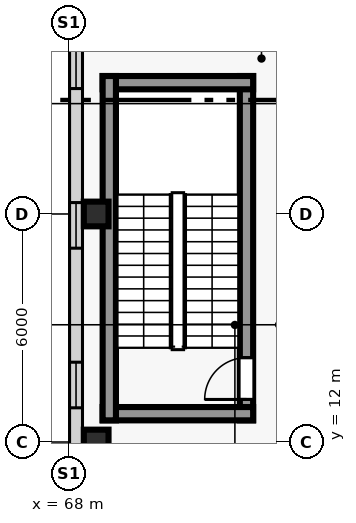
"""IFC4 building model, lengths in metres.
Left out: names, types, materials, properties, quantities, classifications, styles, units other than length and angle.
Written with IfcOpenShell. Run it as: python <this file> out.ifc"""

import sys

from ifc_helpers import new_model, si_unit, direction, frame, frame_2d, origin, origin_2d, place, context, subcontext, project, spatial, rectangle, extrude, source, transform, mapped, element, fill, save


model = new_model("IFC4")
c1 = context("Model", 3, precision=1e-05, world=origin(), true_north=direction((0.0, 1.0)))
c2 = subcontext(c1, "Body", "Model", "MODEL_VIEW")
j1 = project(units=[si_unit("LENGTHUNIT", "METRE"), si_unit("PLANEANGLEUNIT", "RADIAN")], contexts=[c1])
p1 = place(None, origin())
s1 = spatial("IfcSite", under=j1, at=p1, CompositionType="ELEMENT")
p2 = place(p1, origin())
s2 = spatial("IfcBuilding", under=s1, at=p2, CompositionType="ELEMENT")
p3 = place(p2, frame((0.0, 0.0, 9.0)))
s3 = spatial("IfcBuildingStorey", under=s2, at=p3, CompositionType="ELEMENT", Elevation=9.0)
p4 = place(p3, frame((72.655, 12.57, 0.0), z_axis=(0.0, 0.0, 1.0), x_axis=(0.0, 1.0, 0.0)))
e1 = element("IfcWall", 1, at=p4, inside=s3, PredefinedType="SHEAR", context=c2, shape_type="SweptSolid", body=[
    extrude(rectangle(XDim=9.06, YDim=0.35, at=frame_2d((4.53, 0.0))), origin(), (0.0, 0.0, 1.0), 4.5),
])
p5 = place(p4, frame((0.55, 0.0, 0.0)))
e2 = element("IfcOpeningElement", 2, at=p5, cuts=e1, PredefinedType="OPENING", context=c2, shape_type="SweptSolid", body=[
    extrude(rectangle(XDim=1.1, YDim=2.2, at=frame_2d((0.55, 1.1))), frame((0.0, 0.185, 0.0), z_axis=(0.0, -1.0, 0.0), x_axis=(1.0, 0.0, 0.0)), (0.0, 0.0, 1.0), 0.37),
])
for number, where, z_axis, x_axis in (
    (3, (68.87, 12.745, 0.0), (0.0, 0.0, 1.0), (1.0, 0.0, 0.0)),
    (4, (68.87, 21.455, 0.0), (0.0, 0.0, 1.0), (1.0, 0.0, 0.0)),
):
    element("IfcWall", number, at=place(p3, frame(where, z_axis=z_axis, x_axis=x_axis)), inside=s3, PredefinedType="SHEAR", context=c2, shape_type="SweptSolid", body=[
        extrude(rectangle(XDim=3.96, YDim=0.35, at=frame_2d((1.98, 0.0))), origin(), (0.0, 0.0, 1.0), 4.5),
    ])
p6 = place(p3, frame((69.045, 12.57, 0.0), z_axis=(0.0, 0.0, 1.0), x_axis=(0.0, 1.0, 0.0)))
e5 = element("IfcWall", 5, at=p6, inside=s3, PredefinedType="SHEAR", context=c2, shape_type="SweptSolid", body=[
    extrude(rectangle(XDim=9.06, YDim=0.35, at=frame_2d((4.53, 0.0))), origin(), (0.0, 0.0, 1.0), 4.5),
])
m1 = source(origin(), c2, "Body", "SweptSolid", [
    extrude(rectangle(XDim=0.65, YDim=0.65, at=origin_2d()), origin(), (0.0, 0.0, 1.0), 4.5),
])
for number, where, z_axis, x_axis in (
    (6, (68.7, 12.0, 0.0), (0.0, 0.0, 1.0), (1.0, 0.0, 0.0)),
    (7, (68.7, 18.0, 0.0), (0.0, 0.0, 1.0), (1.0, 0.0, 0.0)),
):
    element("IfcColumn", number, at=place(p3, frame(where, z_axis=z_axis, x_axis=x_axis)), inside=s3, PredefinedType="COLUMN", context=c2, shape_type="MappedRepresentation", body=[
        mapped(m1, transform((0.0, 0.0, 0.0), scale=1.0)),
    ])
p7 = place(p3, frame((68.17, 41.83, 0.0), z_axis=(0.0, 0.0, 1.0), x_axis=(0.0, -1.0, 0.0)))
e8 = element("IfcWall", 8, at=p7, inside=s3, PredefinedType="SOLIDWALL", context=c2, shape_type="SweptSolid", body=[
    extrude(rectangle(XDim=35.66, YDim=0.34, at=frame_2d((17.83, 0.0))), origin(), (0.0, 0.0, 1.0), 4.2),
])
p8 = place(p7, frame((2.53, 0.0, 0.95)))
e9 = element("IfcOpeningElement", 9, at=p8, cuts=e8, PredefinedType="OPENING", context=c2, shape_type="SweptSolid", body=[
    extrude(rectangle(XDim=1.2, YDim=1.5, at=frame_2d((0.6, 0.75))), frame((0.0, 0.18, 0.0), z_axis=(0.0, -1.0, 0.0), x_axis=(1.0, 0.0, 0.0)), (0.0, 0.0, 1.0), 0.36),
])
p9 = place(p7, frame((6.73, 0.0, 0.95)))
e10 = element("IfcOpeningElement", 10, at=p9, cuts=e8, PredefinedType="OPENING", context=c2, shape_type="SweptSolid", body=[
    extrude(rectangle(XDim=1.2, YDim=1.5, at=frame_2d((0.6, 0.75))), frame((0.0, 0.18, 0.0), z_axis=(0.0, -1.0, 0.0), x_axis=(1.0, 0.0, 0.0)), (0.0, 0.0, 1.0), 0.36),
])
p10 = place(p7, frame((10.93, 0.0, 0.95)))
e11 = element("IfcOpeningElement", 11, at=p10, cuts=e8, PredefinedType="OPENING", context=c2, shape_type="SweptSolid", body=[
    extrude(rectangle(XDim=1.2, YDim=1.5, at=frame_2d((0.6, 0.75))), frame((0.0, 0.18, 0.0), z_axis=(0.0, -1.0, 0.0), x_axis=(1.0, 0.0, 0.0)), (0.0, 0.0, 1.0), 0.36),
])
p11 = place(p7, frame((15.13, 0.0, 0.95)))
e12 = element("IfcOpeningElement", 12, at=p11, cuts=e8, PredefinedType="OPENING", context=c2, shape_type="SweptSolid", body=[
    extrude(rectangle(XDim=1.2, YDim=1.5, at=frame_2d((0.6, 0.75))), frame((0.0, 0.18, 0.0), z_axis=(0.0, -1.0, 0.0), x_axis=(1.0, 0.0, 0.0)), (0.0, 0.0, 1.0), 0.36),
])
p12 = place(p7, frame((19.33, 0.0, 0.95)))
e13 = element("IfcOpeningElement", 13, at=p12, cuts=e8, PredefinedType="OPENING", context=c2, shape_type="SweptSolid", body=[
    extrude(rectangle(XDim=1.2, YDim=1.5, at=frame_2d((0.6, 0.75))), frame((0.0, 0.18, 0.0), z_axis=(0.0, -1.0, 0.0), x_axis=(1.0, 0.0, 0.0)), (0.0, 0.0, 1.0), 0.36),
])
p13 = place(p7, frame((23.53, 0.0, 0.95)))
e14 = element("IfcOpeningElement", 14, at=p13, cuts=e8, PredefinedType="OPENING", context=c2, shape_type="SweptSolid", body=[
    extrude(rectangle(XDim=1.2, YDim=1.5, at=frame_2d((0.6, 0.75))), frame((0.0, 0.18, 0.0), z_axis=(0.0, -1.0, 0.0), x_axis=(1.0, 0.0, 0.0)), (0.0, 0.0, 1.0), 0.36),
])
p14 = place(p7, frame((27.73, 0.0, 0.95)))
e15 = element("IfcOpeningElement", 15, at=p14, cuts=e8, PredefinedType="OPENING", context=c2, shape_type="SweptSolid", body=[
    extrude(rectangle(XDim=1.2, YDim=1.5, at=frame_2d((0.6, 0.75))), frame((0.0, 0.18, 0.0), z_axis=(0.0, -1.0, 0.0), x_axis=(1.0, 0.0, 0.0)), (0.0, 0.0, 1.0), 0.36),
])
p15 = place(p7, frame((31.93, 0.0, 0.95)))
e16 = element("IfcOpeningElement", 16, at=p15, cuts=e8, PredefinedType="OPENING", context=c2, shape_type="SweptSolid", body=[
    extrude(rectangle(XDim=1.2, YDim=1.5, at=frame_2d((0.6, 0.75))), frame((0.0, 0.18, 0.0), z_axis=(0.0, -1.0, 0.0), x_axis=(1.0, 0.0, 0.0)), (0.0, 0.0, 1.0), 0.36),
])
m2 = source(origin(), c2, "Body", "SweptSolid", [
    extrude(rectangle(XDim=1.2, YDim=1.5, at=frame_2d((0.6, 0.75))), frame((0.0, 0.03, 0.0), z_axis=(0.0, -1.0, 0.0), x_axis=(1.0, 0.0, 0.0)), (0.0, 0.0, 1.0), 0.06),
])
p16 = place(p12, origin())
e17 = element("IfcWindow", 17, at=p16, inside=s3, PartitioningType="SINGLE_PANEL", PredefinedType="WINDOW", context=c2, shape_type="MappedRepresentation", body=[
    mapped(m2, transform((0.0, 0.0, 0.0), scale=1.0)),
])
fill(e13, e17)
p17 = place(p13, origin())
e18 = element("IfcWindow", 18, at=p17, inside=s3, PartitioningType="SINGLE_PANEL", PredefinedType="WINDOW", context=c2, shape_type="MappedRepresentation", body=[
    mapped(m2, transform((0.0, 0.0, 0.0), scale=1.0)),
])
fill(e14, e18)
p18 = place(p14, origin())
e19 = element("IfcWindow", 19, at=p18, inside=s3, PartitioningType="SINGLE_PANEL", PredefinedType="WINDOW", context=c2, shape_type="MappedRepresentation", body=[
    mapped(m2, transform((0.0, 0.0, 0.0), scale=1.0)),
])
fill(e15, e19)
m3 = source(origin(), c2, "Body", "SweptSolid", [
    extrude(rectangle(XDim=1.1, YDim=2.2, at=frame_2d((0.55, 1.1))), frame((0.0, 0.025, 0.0), z_axis=(0.0, -1.0, 0.0), x_axis=(1.0, 0.0, 0.0)), (0.0, 0.0, 1.0), 0.05),
])
p19 = place(p5, origin())
e20 = element("IfcDoor", 20, at=p19, inside=s3, OperationType="SINGLE_SWING_LEFT", PredefinedType="DOOR", context=c2, shape_type="MappedRepresentation", body=[
    mapped(m3, transform((0.0, 0.0, 0.0), scale=1.0)),
])
fill(e2, e20)
save(model, sys.argv[1])
